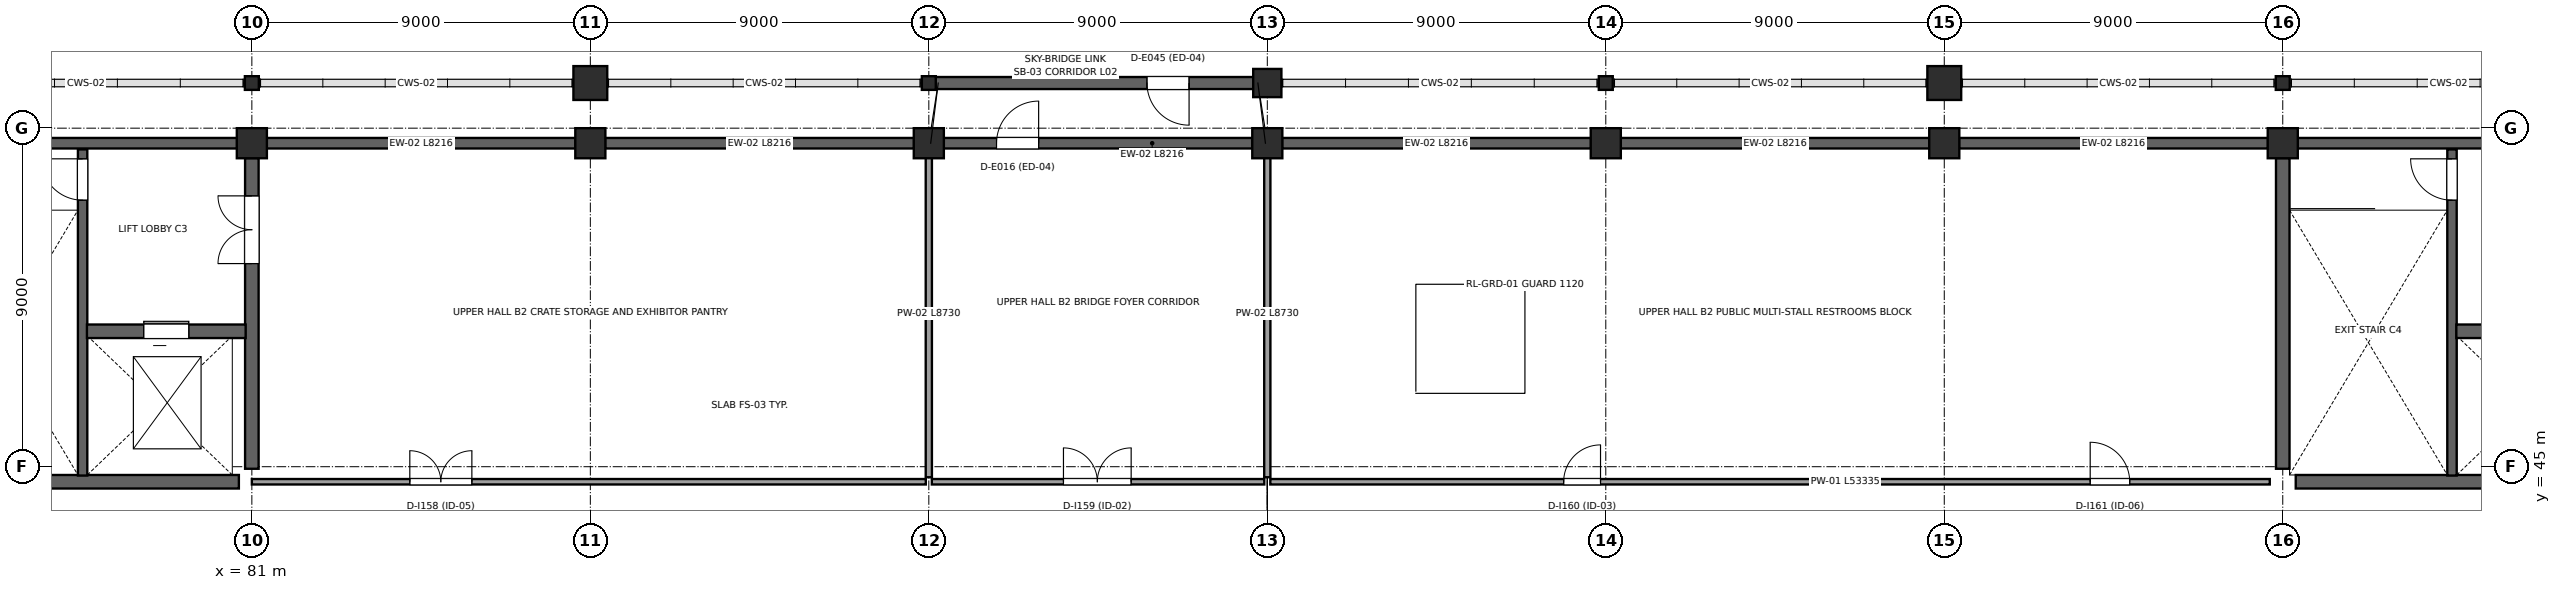
"""IFC4 building model, lengths in metres.
Left out: names, types, materials, properties, quantities, classifications, styles, units other than length and angle.
Written with IfcOpenShell. Run it as: python <this file> out.ifc"""

import sys

from ifc_helpers import new_model, si_unit, direction, frame, frame_2d, origin, origin_2d, place, context, subcontext, project, spatial, rectangle, circle, i_section, extrude, element, fill, save


model = new_model("IFC4")
c1 = context("Model", 3, precision=1e-05, world=origin(), true_north=direction((0.0, 1.0)))
c2 = subcontext(c1, "Body", "Model", "MODEL_VIEW")
j1 = project(units=[si_unit("LENGTHUNIT", "METRE"), si_unit("PLANEANGLEUNIT", "RADIAN")], contexts=[c1])
p1 = place(None, origin())
s1 = spatial("IfcSite", under=j1, at=p1, CompositionType="ELEMENT")
p2 = place(p1, origin())
s2 = spatial("IfcBuilding", under=s1, at=p2, CompositionType="ELEMENT")
p3 = place(p2, frame((0.0, 0.0, 12.0)))
s3 = spatial("IfcBuildingStorey", under=s2, at=p3, CompositionType="ELEMENT", Elevation=12.0)
for number, where, z_axis, x_axis in (
    (1, (81.0, 53.6, 0.0), (0.0, 0.0, 1.0), (1.0, 0.0, 0.0)),
    (2, (90.0, 53.6, 0.0), (0.0, 0.0, 1.0), (1.0, 0.0, 0.0)),
    (3, (99.0, 53.6, 0.0), (0.0, 0.0, 1.0), (1.0, 0.0, 0.0)),
    (4, (108.0, 53.6, 0.0), (0.0, 0.0, 1.0), (1.0, 0.0, 0.0)),
    (5, (117.0, 53.6, 0.0), (0.0, 0.0, 1.0), (1.0, 0.0, 0.0)),
    (6, (126.0, 53.6, 0.0), (0.0, 0.0, 1.0), (1.0, 0.0, 0.0)),
    (7, (135.0, 53.6, 0.0), (0.0, 0.0, 1.0), (1.0, 0.0, 0.0)),
):
    element("IfcColumn", number, at=place(p3, frame(where, z_axis=z_axis, x_axis=x_axis)), inside=s3, PredefinedType="COLUMN", context=c2, shape_type="SweptSolid", body=[
        extrude(rectangle(XDim=0.8, YDim=0.8, at=origin_2d()), origin(), (0.0, 0.0, 1.0), 4.5),
    ])
p4 = place(p3, frame((81.0, 55.2, 0.0), z_axis=(0.0, 0.0, 1.0), x_axis=(1.0, 0.0, 0.0)))
e8 = element("IfcColumn", 8, at=p4, inside=s3, PredefinedType="COLUMN", context=c2, shape_type="SweptSolid", body=[
    extrude(i_section(OverallWidth=0.371, OverallDepth=0.364, WebThickness=0.013, FlangeThickness=0.022, at=origin_2d()), origin(), (0.0, 0.0, 1.0), 4.5),
])
p5 = place(p3, frame((90.0, 55.2, 0.0), z_axis=(0.0, 0.0, 1.0), x_axis=(1.0, 0.0, 0.0)))
e9 = element("IfcColumn", 9, at=p5, inside=s3, PredefinedType="COLUMN", context=c2, shape_type="SweptSolid", body=[
    extrude(circle(Radius=0.45, at=origin_2d()), origin(), (0.0, 0.0, 1.0), 4.5),
])
p6 = place(p3, frame((99.0, 55.2, 0.0), z_axis=(0.0, 0.0, 1.0), x_axis=(1.0, 0.0, 0.0)))
e10 = element("IfcColumn", 10, at=p6, inside=s3, PredefinedType="COLUMN", context=c2, shape_type="SweptSolid", body=[
    extrude(i_section(OverallWidth=0.371, OverallDepth=0.364, WebThickness=0.013, FlangeThickness=0.022, at=origin_2d()), origin(), (0.0, 0.0, 1.0), 4.5),
])
p7 = place(p3, frame((108.0, 55.2, 0.0), z_axis=(0.0, 0.0, 1.0), x_axis=(1.0, 0.0, 0.0)))
e11 = element("IfcColumn", 11, at=p7, inside=s3, PredefinedType="PILASTER", context=c2, shape_type="SweptSolid", body=[
    extrude(circle(Radius=0.375, at=origin_2d()), origin(), (0.0, 0.0, 1.0), 4.5),
])
p8 = place(p3, frame((117.0, 55.2, 0.0), z_axis=(0.0, 0.0, 1.0), x_axis=(1.0, 0.0, 0.0)))
e12 = element("IfcColumn", 12, at=p8, inside=s3, PredefinedType="COLUMN", context=c2, shape_type="SweptSolid", body=[
    extrude(i_section(OverallWidth=0.371, OverallDepth=0.364, WebThickness=0.013, FlangeThickness=0.022, at=origin_2d()), origin(), (0.0, 0.0, 1.0), 4.5),
])
p9 = place(p3, frame((126.0, 55.2, 0.0), z_axis=(0.0, 0.0, 1.0), x_axis=(1.0, 0.0, 0.0)))
e13 = element("IfcColumn", 13, at=p9, inside=s3, PredefinedType="COLUMN", context=c2, shape_type="SweptSolid", body=[
    extrude(circle(Radius=0.45, at=origin_2d()), origin(), (0.0, 0.0, 1.0), 4.5),
])
p10 = place(p3, frame((135.0, 55.2, 0.0), z_axis=(0.0, 0.0, 1.0), x_axis=(1.0, 0.0, 0.0)))
e14 = element("IfcColumn", 14, at=p10, inside=s3, PredefinedType="COLUMN", context=c2, shape_type="SweptSolid", body=[
    extrude(i_section(OverallWidth=0.371, OverallDepth=0.364, WebThickness=0.013, FlangeThickness=0.022, at=origin_2d()), origin(), (0.0, 0.0, 1.0), 4.5),
])
for number, where, z_axis, x_axis in (
    (15, (72.392, 53.6, 0.0), (0.0, 0.0, 1.0), (1.0, 0.0, 0.0)),
    (16, (81.392, 53.6, 0.0), (0.0, 0.0, 1.0), (1.0, 0.0, 0.0)),
    (17, (90.392, 53.6, 0.0), (0.0, 0.0, 1.0), (1.0, 0.0, 0.0)),
):
    element("IfcWall", number, at=place(p3, frame(where, z_axis=z_axis, x_axis=x_axis)), inside=s3, PredefinedType="STANDARD", context=c2, shape_type="SweptSolid", body=[
        extrude(rectangle(XDim=8.216, YDim=0.28, at=frame_2d((4.108, 0.0))), origin(), (0.0, 0.0, 1.0), 4.5),
    ])
p11 = place(p3, frame((99.392, 53.6, 0.0), z_axis=(0.0, 0.0, 1.0), x_axis=(1.0, 0.0, 0.0)))
e18 = element("IfcWall", 18, at=p11, inside=s3, PredefinedType="STANDARD", context=c2, shape_type="SweptSolid", body=[
    extrude(rectangle(XDim=8.216, YDim=0.28, at=frame_2d((4.108, 0.0))), origin(), (0.0, 0.0, 1.0), 4.5),
])
p12 = place(p11, frame((1.408, 0.0, 0.0)))
e19 = element("IfcOpeningElement", 19, at=p12, cuts=e18, PredefinedType="OPENING", context=c2, shape_type="SweptSolid", body=[
    extrude(rectangle(XDim=1.12, YDim=2.24, at=frame_2d((0.56, 1.12))), frame((0.0, 0.15, 0.0), z_axis=(0.0, -1.0, 0.0), x_axis=(1.0, 0.0, 0.0)), (0.0, 0.0, 1.0), 0.3),
])
for number, where, z_axis, x_axis in (
    (20, (108.392, 53.6, 0.0), (0.0, 0.0, 1.0), (1.0, 0.0, 0.0)),
    (21, (117.392, 53.6, 0.0), (0.0, 0.0, 1.0), (1.0, 0.0, 0.0)),
    (22, (126.392, 53.6, 0.0), (0.0, 0.0, 1.0), (1.0, 0.0, 0.0)),
    (23, (135.392, 53.6, 0.0), (0.0, 0.0, 1.0), (1.0, 0.0, 0.0)),
):
    element("IfcWall", number, at=place(p3, frame(where, z_axis=z_axis, x_axis=x_axis)), inside=s3, PredefinedType="STANDARD", context=c2, shape_type="SweptSolid", body=[
        extrude(rectangle(XDim=8.216, YDim=0.28, at=frame_2d((4.108, 0.0))), origin(), (0.0, 0.0, 1.0), 4.5),
    ])
p13 = place(p3, frame((107.64, 55.2, 0.0), z_axis=(0.0, 0.0, 1.0), x_axis=(-1.0, 0.0, 0.0)))
e24 = element("IfcWall", 24, at=p13, inside=s3, PredefinedType="STANDARD", context=c2, shape_type="SweptSolid", body=[
    extrude(rectangle(XDim=8.627, YDim=0.32, at=frame_2d((4.313, 0.0))), origin(), (0.0, 0.0, 1.0), 4.325),
])
p14 = place(p13, frame((1.72, 0.0, 0.0)))
e25 = element("IfcOpeningElement", 25, at=p14, cuts=e24, PredefinedType="OPENING", context=c2, shape_type="SweptSolid", body=[
    extrude(rectangle(XDim=1.12, YDim=2.24, at=frame_2d((0.56, 1.12))), frame((0.0, 0.17, 0.0), z_axis=(0.0, -1.0, 0.0), x_axis=(1.0, 0.0, 0.0)), (0.0, 0.0, 1.0), 0.34),
])
p15 = place(p3, frame((81.0, 44.945, 0.0), z_axis=(0.0, 0.0, 1.0), x_axis=(0.0, 1.0, 0.0)))
e26 = element("IfcWall", 26, at=p15, inside=s3, PredefinedType="SHEAR", context=c2, shape_type="SweptSolid", body=[
    extrude(rectangle(XDim=8.26, YDim=0.36, at=frame_2d((4.13, 0.0))), origin(), (0.0, 0.0, 1.0), 7.5),
])
p16 = place(p15, frame((5.455, 0.0, 0.0)))
e27 = element("IfcOpeningElement", 27, at=p16, cuts=e26, PredefinedType="OPENING", context=c2, shape_type="SweptSolid", body=[
    extrude(rectangle(XDim=1.8, YDim=2.3, at=frame_2d((0.9, 1.15))), frame((0.0, 0.19, 0.0), z_axis=(0.0, -1.0, 0.0), x_axis=(1.0, 0.0, 0.0)), (0.0, 0.0, 1.0), 0.38),
])
p17 = place(p3, frame((72.395, 44.6, 0.0), z_axis=(0.0, 0.0, 1.0), x_axis=(1.0, 0.0, 0.0)))
e28 = element("IfcWall", 28, at=p17, inside=s3, PredefinedType="SHEAR", context=c2, shape_type="SweptSolid", body=[
    extrude(rectangle(XDim=8.26, YDim=0.36, at=frame_2d((4.13, 0.0))), origin(), (0.0, 0.0, 1.0), 7.5),
])
p18 = place(p3, frame((76.5, 44.765, 0.0), z_axis=(0.0, 0.0, 1.0), x_axis=(0.0, 1.0, 0.0)))
e29 = element("IfcWall", 29, at=p18, inside=s3, PredefinedType="SHEAR", context=c2, shape_type="SweptSolid", body=[
    extrude(rectangle(XDim=8.67, YDim=0.25, at=frame_2d((4.335, 0.0))), origin(), (0.0, 0.0, 1.0), 7.5),
])
p19 = place(p18, frame((7.32, 0.0, 0.0)))
e30 = element("IfcOpeningElement", 30, at=p19, cuts=e29, PredefinedType="OPENING", context=c2, shape_type="SweptSolid", body=[
    extrude(rectangle(XDim=1.1, YDim=2.2, at=frame_2d((0.55, 1.1))), frame((0.0, 0.135, 0.0), z_axis=(0.0, -1.0, 0.0), x_axis=(1.0, 0.0, 0.0)), (0.0, 0.0, 1.0), 0.27),
])
p20 = place(p3, frame((76.615, 48.6, 0.0), z_axis=(0.0, 0.0, 1.0), x_axis=(1.0, 0.0, 0.0)))
e31 = element("IfcWall", 31, at=p20, inside=s3, PredefinedType="SHEAR", context=c2, shape_type="SweptSolid", body=[
    extrude(rectangle(XDim=4.22, YDim=0.36, at=frame_2d((2.11, 0.0))), origin(), (0.0, 0.0, 1.0), 7.5),
])
p21 = place(p20, frame((1.51, 0.0, 0.0)))
e32 = element("IfcOpeningElement", 32, at=p21, cuts=e31, PredefinedType="OPENING", context=c2, shape_type="SweptSolid", body=[
    extrude(rectangle(XDim=1.2, YDim=2.3, at=frame_2d((0.6, 1.15))), frame((0.0, 0.19, 0.0), z_axis=(0.0, -1.0, 0.0), x_axis=(1.0, 0.0, 0.0)), (0.0, 0.0, 1.0), 0.38),
])
p22 = place(p3, frame((135.0, 44.945, 0.0), z_axis=(0.0, 0.0, 1.0), x_axis=(0.0, 1.0, 0.0)))
e33 = element("IfcWall", 33, at=p22, inside=s3, PredefinedType="SHEAR", context=c2, shape_type="SweptSolid", body=[
    extrude(rectangle(XDim=8.26, YDim=0.36, at=frame_2d((4.13, 0.0))), origin(), (0.0, 0.0, 1.0), 7.5),
])
p23 = place(p3, frame((135.345, 44.6, 0.0), z_axis=(0.0, 0.0, 1.0), x_axis=(1.0, 0.0, 0.0)))
e34 = element("IfcWall", 34, at=p23, inside=s3, PredefinedType="SHEAR", context=c2, shape_type="SweptSolid", body=[
    extrude(rectangle(XDim=8.16, YDim=0.36, at=frame_2d((4.08, 0.0))), origin(), (0.0, 0.0, 1.0), 7.5),
])
p24 = place(p3, frame((139.5, 44.765, 0.0), z_axis=(0.0, 0.0, 1.0), x_axis=(0.0, 1.0, 0.0)))
e35 = element("IfcWall", 35, at=p24, inside=s3, PredefinedType="SHEAR", context=c2, shape_type="SweptSolid", body=[
    extrude(rectangle(XDim=8.67, YDim=0.25, at=frame_2d((4.335, 0.0))), origin(), (0.0, 0.0, 1.0), 7.5),
])
p25 = place(p24, frame((7.32, 0.0, 0.0)))
e36 = element("IfcOpeningElement", 36, at=p25, cuts=e35, PredefinedType="OPENING", context=c2, shape_type="SweptSolid", body=[
    extrude(rectangle(XDim=1.1, YDim=2.2, at=frame_2d((0.55, 1.1))), frame((0.0, 0.135, 0.0), z_axis=(0.0, -1.0, 0.0), x_axis=(1.0, 0.0, 0.0)), (0.0, 0.0, 1.0), 0.27),
])
p26 = place(p3, frame((139.615, 48.6, 0.0), z_axis=(0.0, 0.0, 1.0), x_axis=(1.0, 0.0, 0.0)))
e37 = element("IfcWall", 37, at=p26, inside=s3, PredefinedType="SHEAR", context=c2, shape_type="SweptSolid", body=[
    extrude(rectangle(XDim=4.22, YDim=0.36, at=frame_2d((2.11, 0.0))), origin(), (0.0, 0.0, 1.0), 7.5),
])
p27 = place(p26, frame((1.51, 0.0, 0.0)))
e38 = element("IfcOpeningElement", 38, at=p27, cuts=e37, PredefinedType="OPENING", context=c2, shape_type="SweptSolid", body=[
    extrude(rectangle(XDim=1.2, YDim=2.3, at=frame_2d((0.6, 1.15))), frame((0.0, 0.19, 0.0), z_axis=(0.0, -1.0, 0.0), x_axis=(1.0, 0.0, 0.0)), (0.0, 0.0, 1.0), 0.38),
])
p28 = place(p3, frame((81.0, 44.6, 0.0), z_axis=(0.0, 0.0, 1.0), x_axis=(1.0, 0.0, 0.0)))
e39 = element("IfcWall", 39, at=p28, inside=s3, PredefinedType="PARTITIONING", context=c2, shape_type="SweptSolid", body=[
    extrude(rectangle(XDim=17.92, YDim=0.145, at=frame_2d((8.96, 0.0))), origin(), (0.0, 0.0, 1.0), 5.5),
])
p29 = place(p28, frame((4.2, 0.0, 0.0)))
e40 = element("IfcOpeningElement", 40, at=p29, cuts=e39, PredefinedType="OPENING", context=c2, shape_type="SweptSolid", body=[
    extrude(rectangle(XDim=1.65, YDim=2.25, at=frame_2d((0.825, 1.125))), frame((0.0, 0.083, 0.0), z_axis=(0.0, -1.0, 0.0), x_axis=(1.0, 0.0, 0.0)), (0.0, 0.0, 1.0), 0.165),
])
p30 = place(p3, frame((99.08, 44.6, 0.0), z_axis=(0.0, 0.0, 1.0), x_axis=(1.0, 0.0, 0.0)))
e41 = element("IfcWall", 41, at=p30, inside=s3, PredefinedType="PARTITIONING", context=c2, shape_type="SweptSolid", body=[
    extrude(rectangle(XDim=8.84, YDim=0.145, at=frame_2d((4.42, 0.0))), origin(), (0.0, 0.0, 1.0), 5.5),
])
p31 = place(p30, frame((3.5, 0.0, 0.0)))
e42 = element("IfcOpeningElement", 42, at=p31, cuts=e41, PredefinedType="OPENING", context=c2, shape_type="SweptSolid", body=[
    extrude(rectangle(XDim=1.8, YDim=2.3, at=frame_2d((0.9, 1.15))), frame((0.0, 0.083, 0.0), z_axis=(0.0, -1.0, 0.0), x_axis=(1.0, 0.0, 0.0)), (0.0, 0.0, 1.0), 0.165),
])
p32 = place(p3, frame((108.08, 44.6, 0.0), z_axis=(0.0, 0.0, 1.0), x_axis=(1.0, 0.0, 0.0)))
e43 = element("IfcWall", 43, at=p32, inside=s3, PredefinedType="PARTITIONING", context=c2, shape_type="SweptSolid", body=[
    extrude(rectangle(XDim=26.575, YDim=0.145, at=frame_2d((13.288, 0.0))), origin(), (0.0, 0.0, 1.0), 5.5),
])
p33 = place(p32, frame((7.8, 0.0, 0.0)))
e44 = element("IfcOpeningElement", 44, at=p33, cuts=e43, PredefinedType="OPENING", context=c2, shape_type="SweptSolid", body=[
    extrude(rectangle(XDim=0.98, YDim=2.15, at=frame_2d((0.49, 1.075))), frame((0.0, 0.083, 0.0), z_axis=(0.0, -1.0, 0.0), x_axis=(1.0, 0.0, 0.0)), (0.0, 0.0, 1.0), 0.165),
])
p34 = place(p32, frame((21.8, 0.0, 0.0)))
e45 = element("IfcOpeningElement", 45, at=p34, cuts=e43, PredefinedType="OPENING", context=c2, shape_type="SweptSolid", body=[
    extrude(rectangle(XDim=1.05, YDim=2.18, at=frame_2d((0.525, 1.09))), frame((0.0, 0.083, 0.0), z_axis=(0.0, -1.0, 0.0), x_axis=(1.0, 0.0, 0.0)), (0.0, 0.0, 1.0), 0.165),
])
for number, where, z_axis, x_axis in (
    (46, (99.0, 44.72, 0.0), (0.0, 0.0, 1.0), (0.0, 1.0, 0.0)),
    (47, (108.0, 44.72, 0.0), (0.0, 0.0, 1.0), (0.0, 1.0, 0.0)),
):
    element("IfcWall", number, at=place(p3, frame(where, z_axis=z_axis, x_axis=x_axis)), inside=s3, PredefinedType="PARTITIONING", context=c2, shape_type="SweptSolid", body=[
        extrude(rectangle(XDim=8.73, YDim=0.165, at=frame_2d((4.365, 0.0))), origin(), (0.0, 0.0, 1.0), 5.5),
    ])
p35 = place(p12, origin())
e48 = element("IfcDoor", 48, at=p35, inside=s3, OperationType="SINGLE_SWING_RIGHT", PredefinedType="DOOR", context=c2, shape_type="SweptSolid", body=[
    extrude(rectangle(XDim=1.12, YDim=2.24, at=frame_2d((0.56, 1.12))), frame((0.0, 0.025, 0.0), z_axis=(0.0, -1.0, 0.0), x_axis=(1.0, 0.0, 0.0)), (0.0, 0.0, 1.0), 0.05),
])
fill(e19, e48)
p36 = place(p14, origin())
e49 = element("IfcDoor", 49, at=p36, inside=s3, OperationType="SINGLE_SWING_LEFT", PredefinedType="DOOR", context=c2, shape_type="SweptSolid", body=[
    extrude(rectangle(XDim=1.12, YDim=2.24, at=frame_2d((0.56, 1.12))), frame((0.0, 0.025, 0.0), z_axis=(0.0, -1.0, 0.0), x_axis=(1.0, 0.0, 0.0)), (0.0, 0.0, 1.0), 0.05),
])
fill(e25, e49)
p37 = place(p19, origin())
e50 = element("IfcDoor", 50, at=p37, inside=s3, OperationType="SINGLE_SWING_RIGHT", PredefinedType="DOOR", context=c2, shape_type="SweptSolid", body=[
    extrude(rectangle(XDim=1.1, YDim=2.2, at=frame_2d((0.55, 1.1))), frame((0.0, 0.025, 0.0), z_axis=(0.0, -1.0, 0.0), x_axis=(1.0, 0.0, 0.0)), (0.0, 0.0, 1.0), 0.05),
])
fill(e30, e50)
p38 = place(p21, origin())
e51 = element("IfcDoor", 51, at=p38, inside=s3, OperationType="SLIDING_TO_LEFT", PredefinedType="DOOR", context=c2, shape_type="SweptSolid", body=[
    extrude(rectangle(XDim=1.2, YDim=2.3, at=frame_2d((0.6, 1.15))), frame((0.0, 0.025, 0.0), z_axis=(0.0, -1.0, 0.0), x_axis=(1.0, 0.0, 0.0)), (0.0, 0.0, 1.0), 0.05),
])
fill(e32, e51)
p39 = place(p16, origin())
e52 = element("IfcDoor", 52, at=p39, inside=s3, OperationType="DOUBLE_DOOR_SINGLE_SWING", PredefinedType="DOOR", context=c2, shape_type="SweptSolid", body=[
    extrude(rectangle(XDim=1.8, YDim=2.3, at=frame_2d((0.9, 1.15))), frame((0.0, 0.025, 0.0), z_axis=(0.0, -1.0, 0.0), x_axis=(1.0, 0.0, 0.0)), (0.0, 0.0, 1.0), 0.05),
])
fill(e27, e52)
p40 = place(p25, origin())
e53 = element("IfcDoor", 53, at=p40, inside=s3, OperationType="SINGLE_SWING_RIGHT", PredefinedType="DOOR", context=c2, shape_type="SweptSolid", body=[
    extrude(rectangle(XDim=1.1, YDim=2.2, at=frame_2d((0.55, 1.1))), frame((0.0, 0.025, 0.0), z_axis=(0.0, -1.0, 0.0), x_axis=(1.0, 0.0, 0.0)), (0.0, 0.0, 1.0), 0.05),
])
fill(e36, e53)
p41 = place(p29, origin())
e54 = element("IfcDoor", 54, at=p41, inside=s3, OperationType="DOUBLE_DOOR_SINGLE_SWING", PredefinedType="DOOR", context=c2, shape_type="SweptSolid", body=[
    extrude(rectangle(XDim=1.65, YDim=2.25, at=frame_2d((0.825, 1.125))), frame((0.0, 0.025, 0.0), z_axis=(0.0, -1.0, 0.0), x_axis=(1.0, 0.0, 0.0)), (0.0, 0.0, 1.0), 0.05),
])
fill(e40, e54)
p42 = place(p31, origin())
e55 = element("IfcDoor", 55, at=p42, inside=s3, OperationType="DOUBLE_DOOR_SINGLE_SWING", PredefinedType="DOOR", context=c2, shape_type="SweptSolid", body=[
    extrude(rectangle(XDim=1.8, YDim=2.3, at=frame_2d((0.9, 1.15))), frame((0.0, 0.025, 0.0), z_axis=(0.0, -1.0, 0.0), x_axis=(1.0, 0.0, 0.0)), (0.0, 0.0, 1.0), 0.05),
])
fill(e42, e55)
p43 = place(p33, origin())
e56 = element("IfcDoor", 56, at=p43, inside=s3, OperationType="SINGLE_SWING_RIGHT", PredefinedType="DOOR", context=c2, shape_type="SweptSolid", body=[
    extrude(rectangle(XDim=0.98, YDim=2.15, at=frame_2d((0.49, 1.075))), frame((0.0, 0.025, 0.0), z_axis=(0.0, -1.0, 0.0), x_axis=(1.0, 0.0, 0.0)), (0.0, 0.0, 1.0), 0.05),
])
fill(e44, e56)
p44 = place(p34, origin())
e57 = element("IfcDoor", 57, at=p44, inside=s3, OperationType="SINGLE_SWING_LEFT", PredefinedType="DOOR", context=c2, shape_type="SweptSolid", body=[
    extrude(rectangle(XDim=1.05, YDim=2.18, at=frame_2d((0.525, 1.09))), frame((0.0, 0.025, 0.0), z_axis=(0.0, -1.0, 0.0), x_axis=(1.0, 0.0, 0.0)), (0.0, 0.0, 1.0), 0.05),
])
fill(e45, e57)
save(model, sys.argv[1])
